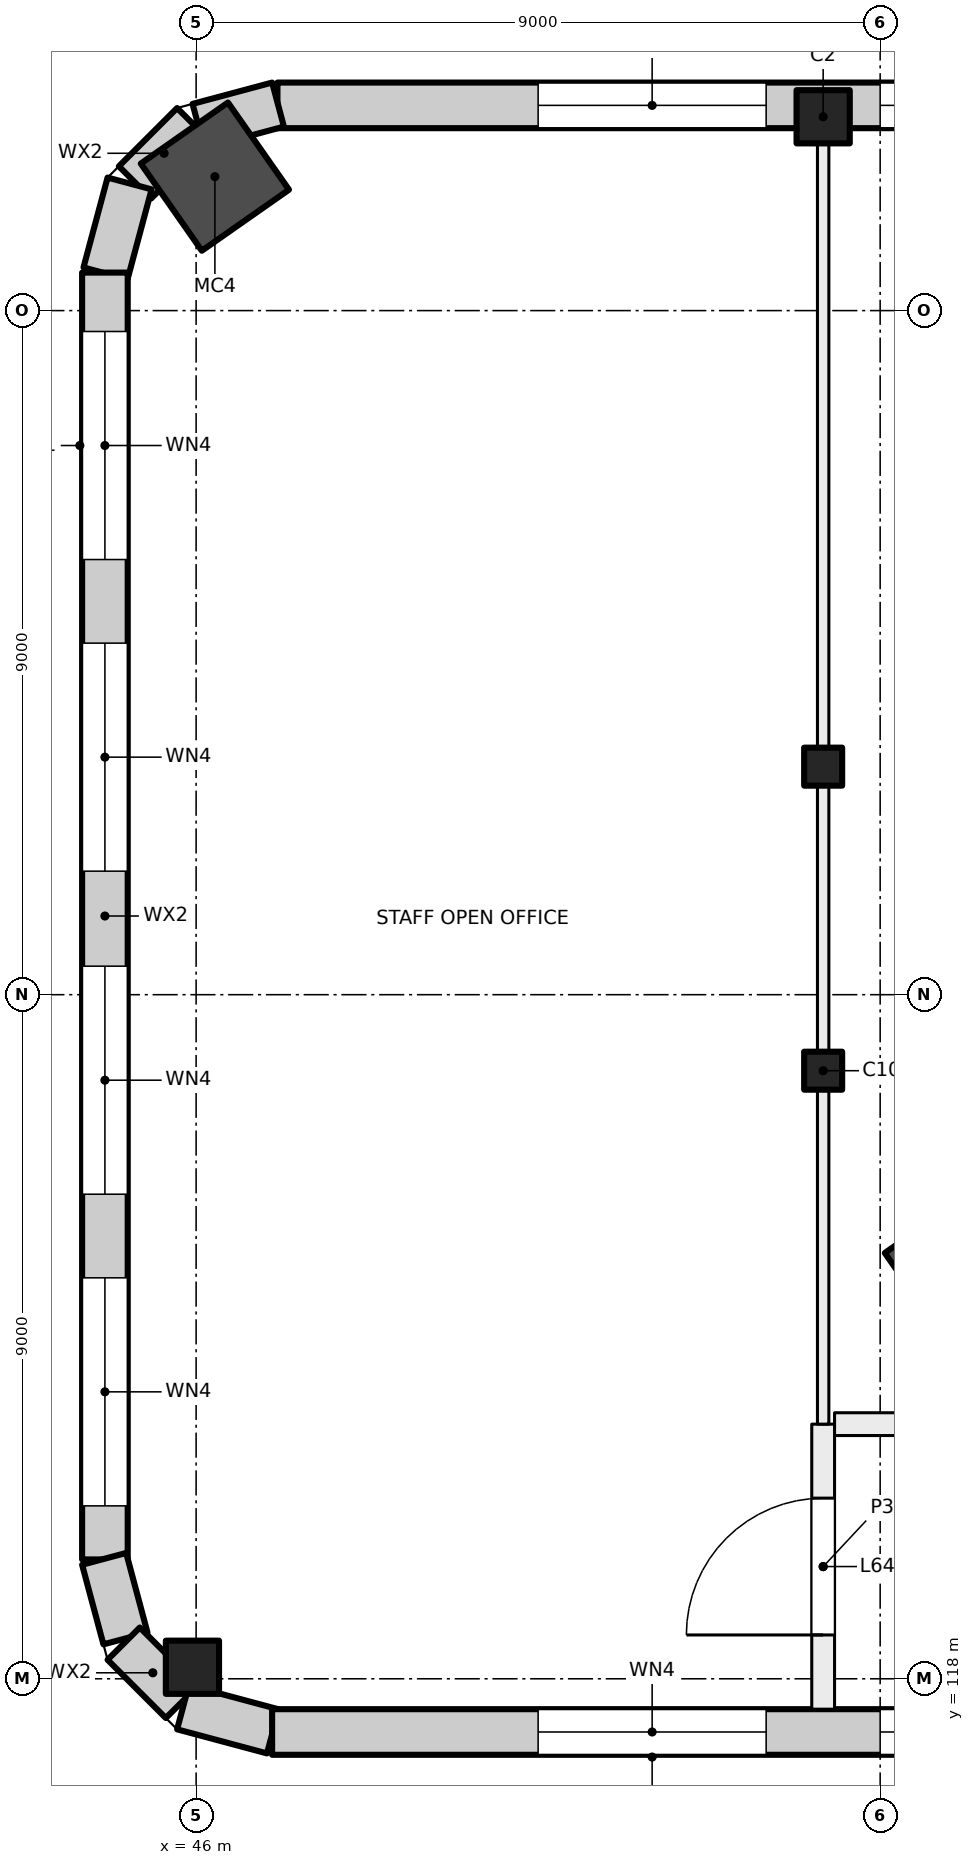
"""IFC4 building model, lengths in metres.
Left out: names, types, materials, properties, quantities, classifications, styles, units other than length and angle.
Written with IfcOpenShell. Run it as: python <this file> out.ifc"""

import sys

from ifc_helpers import new_model, si_unit, direction, frame, frame_2d, origin, origin_2d, place, context, subcontext, project, spatial, rectangle, hollow_rectangle, extrude, element, fill, save


model = new_model("IFC4")
c1 = context("Model", 3, precision=1e-05, world=origin(), true_north=direction((0.0, 1.0)))
c2 = subcontext(c1, "Body", "Model", "MODEL_VIEW")
j1 = project(units=[si_unit("LENGTHUNIT", "METRE"), si_unit("PLANEANGLEUNIT", "RADIAN")], contexts=[c1])
p1 = place(None, origin())
s1 = spatial("IfcSite", under=j1, at=p1, CompositionType="ELEMENT")
p2 = place(p1, origin())
s2 = spatial("IfcBuilding", under=s1, at=p2, CompositionType="ELEMENT")
p3 = place(p2, frame((0.0, 0.0, 269.5)))
s3 = spatial("IfcBuildingStorey", under=s2, at=p3, CompositionType="ELEMENT", Elevation=269.5)
for number, where, z_axis, x_axis in (
    (1, (46.247, 137.762, 0.0), (0.0, 0.0, 1.0), (0.574, -0.819, 0.0)),
    (2, (56.036, 123.43, 0.0), (0.0, 0.0, 1.0), (0.574, -0.819, 0.0)),
):
    element("IfcColumn", number, at=place(p3, frame(where, z_axis=z_axis, x_axis=x_axis)), inside=s3, PredefinedType="COLUMN", context=c2, shape_type="SweptSolid", body=[
        extrude(hollow_rectangle(XDim=1.4, YDim=1.4, WallThickness=0.025, at=origin_2d()), origin(), (0.0, 0.0, 1.0), 4.0),
    ])
for number, where, z_axis, x_axis in (
    (3, (54.25, 130.0, 0.0), (0.0, 0.0, 1.0), (1.0, 0.0, 0.0)),
    (4, (54.25, 126.0, 0.0), (0.0, 0.0, 1.0), (1.0, 0.0, 0.0)),
):
    element("IfcColumn", number, at=place(p3, frame(where, z_axis=z_axis, x_axis=x_axis)), inside=s3, PredefinedType="COLUMN", context=c2, shape_type="SweptSolid", body=[
        extrude(rectangle(XDim=0.5, YDim=0.5, at=origin_2d()), origin(), (0.0, 0.0, 1.0), 4.0),
    ])
for number, where, z_axis, x_axis in (
    (5, (54.25, 138.55, 0.0), (0.0, 0.0, 1.0), (1.0, 0.0, 0.0)),
    (6, (45.952, 118.152, 0.0), (0.0, 0.0, 1.0), (1.0, 0.0, 0.0)),
):
    element("IfcColumn", number, at=place(p3, frame(where, z_axis=z_axis, x_axis=x_axis)), inside=s3, PredefinedType="COLUMN", context=c2, shape_type="SweptSolid", body=[
        extrude(rectangle(XDim=0.7, YDim=0.7, at=origin_2d()), origin(), (0.0, 0.0, 1.0), 4.0),
    ])
p4 = place(p3, frame((47.07, 138.7, 0.0), z_axis=(0.0, 0.0, 1.0), x_axis=(1.0, 0.0, 0.0)))
e7 = element("IfcWall", 7, at=p4, inside=s3, PredefinedType="SOLIDWALL", context=c2, shape_type="SweptSolid", body=[
    extrude(rectangle(XDim=43.91, YDim=0.6, at=frame_2d((21.955, 0.0))), origin(), (0.0, 0.0, 1.0), 3.625),
])
p5 = place(p4, frame((3.43, 0.0, 0.9)))
e8 = element("IfcOpeningElement", 8, at=p5, cuts=e7, PredefinedType="OPENING", context=c2, shape_type="SweptSolid", body=[
    extrude(rectangle(XDim=3.0, YDim=2.4, at=frame_2d((1.5, 1.2))), frame((0.0, 0.31, 0.0), z_axis=(0.0, -1.0, 0.0), x_axis=(1.0, 0.0, 0.0)), (0.0, 0.0, 1.0), 0.62),
])
p6 = place(p4, frame((7.93, 0.0, 0.9)))
e9 = element("IfcOpeningElement", 9, at=p6, cuts=e7, PredefinedType="OPENING", context=c2, shape_type="SweptSolid", body=[
    extrude(rectangle(XDim=3.0, YDim=2.4, at=frame_2d((1.5, 1.2))), frame((0.0, 0.31, 0.0), z_axis=(0.0, -1.0, 0.0), x_axis=(1.0, 0.0, 0.0)), (0.0, 0.0, 1.0), 0.62),
])
p7 = place(p4, frame((12.43, 0.0, 0.9)))
e10 = element("IfcOpeningElement", 10, at=p7, cuts=e7, PredefinedType="OPENING", context=c2, shape_type="SweptSolid", body=[
    extrude(rectangle(XDim=3.0, YDim=2.4, at=frame_2d((1.5, 1.2))), frame((0.0, 0.31, 0.0), z_axis=(0.0, -1.0, 0.0), x_axis=(1.0, 0.0, 0.0)), (0.0, 0.0, 1.0), 0.62),
])
p8 = place(p4, frame((16.93, 0.0, 0.9)))
e11 = element("IfcOpeningElement", 11, at=p8, cuts=e7, PredefinedType="OPENING", context=c2, shape_type="SweptSolid", body=[
    extrude(rectangle(XDim=3.0, YDim=2.4, at=frame_2d((1.5, 1.2))), frame((0.0, 0.31, 0.0), z_axis=(0.0, -1.0, 0.0), x_axis=(1.0, 0.0, 0.0)), (0.0, 0.0, 1.0), 0.62),
])
p9 = place(p4, frame((21.43, 0.0, 0.9)))
e12 = element("IfcOpeningElement", 12, at=p9, cuts=e7, PredefinedType="OPENING", context=c2, shape_type="SweptSolid", body=[
    extrude(rectangle(XDim=3.0, YDim=2.4, at=frame_2d((1.5, 1.2))), frame((0.0, 0.31, 0.0), z_axis=(0.0, -1.0, 0.0), x_axis=(1.0, 0.0, 0.0)), (0.0, 0.0, 1.0), 0.62),
])
p10 = place(p4, frame((25.93, 0.0, 0.9)))
e13 = element("IfcOpeningElement", 13, at=p10, cuts=e7, PredefinedType="OPENING", context=c2, shape_type="SweptSolid", body=[
    extrude(rectangle(XDim=3.0, YDim=2.4, at=frame_2d((1.5, 1.2))), frame((0.0, 0.31, 0.0), z_axis=(0.0, -1.0, 0.0), x_axis=(1.0, 0.0, 0.0)), (0.0, 0.0, 1.0), 0.62),
])
p11 = place(p4, frame((30.43, 0.0, 0.9)))
e14 = element("IfcOpeningElement", 14, at=p11, cuts=e7, PredefinedType="OPENING", context=c2, shape_type="SweptSolid", body=[
    extrude(rectangle(XDim=3.0, YDim=2.4, at=frame_2d((1.5, 1.2))), frame((0.0, 0.31, 0.0), z_axis=(0.0, -1.0, 0.0), x_axis=(1.0, 0.0, 0.0)), (0.0, 0.0, 1.0), 0.62),
])
p12 = place(p4, frame((34.93, 0.0, 0.9)))
e15 = element("IfcOpeningElement", 15, at=p12, cuts=e7, PredefinedType="OPENING", context=c2, shape_type="SweptSolid", body=[
    extrude(rectangle(XDim=3.0, YDim=2.4, at=frame_2d((1.5, 1.2))), frame((0.0, 0.31, 0.0), z_axis=(0.0, -1.0, 0.0), x_axis=(1.0, 0.0, 0.0)), (0.0, 0.0, 1.0), 0.62),
])
p13 = place(p4, frame((39.43, 0.0, 0.9)))
e16 = element("IfcOpeningElement", 16, at=p13, cuts=e7, PredefinedType="OPENING", context=c2, shape_type="SweptSolid", body=[
    extrude(rectangle(XDim=3.0, YDim=2.4, at=frame_2d((1.5, 1.2))), frame((0.0, 0.31, 0.0), z_axis=(0.0, -1.0, 0.0), x_axis=(1.0, 0.0, 0.0)), (0.0, 0.0, 1.0), 0.62),
])
p14 = place(p3, frame((46.031, 138.43, 0.0), z_axis=(0.0, 0.0, 1.0), x_axis=(0.965939004864, 0.25876985698, 0.0)))
e17 = element("IfcWall", 17, at=p14, inside=s3, PredefinedType="SOLIDWALL", context=c2, shape_type="SweptSolid", body=[
    extrude(rectangle(XDim=1.084, YDim=0.6, at=frame_2d((0.542, 0.0))), origin(), (0.0, 0.0, 1.0), 3.625),
])
p15 = place(p3, frame((45.196, 137.686, 0.0), z_axis=(0.0, 0.0, 1.0), x_axis=(0.707106781187, 0.707106781187, 0.0)))
e18 = element("IfcWall", 18, at=p15, inside=s3, PredefinedType="SOLIDWALL", context=c2, shape_type="SweptSolid", body=[
    extrude(rectangle(XDim=1.084, YDim=0.6, at=frame_2d((0.542, 0.0))), origin(), (0.0, 0.0, 1.0), 3.625),
])
p16 = place(p3, frame((44.808, 136.49, 0.0), z_axis=(0.0, 0.0, 1.0), x_axis=(0.258878975098, 0.965909766102, 0.0)))
e19 = element("IfcWall", 19, at=p16, inside=s3, PredefinedType="SOLIDWALL", context=c2, shape_type="SweptSolid", body=[
    extrude(rectangle(XDim=1.224, YDim=0.6, at=frame_2d((0.612, 0.0))), origin(), (0.0, 0.0, 1.0), 3.625),
])
p17 = place(p3, frame((44.8, 119.57, 0.0), z_axis=(0.0, 0.0, 1.0), x_axis=(0.0, 1.0, 0.0)))
e20 = element("IfcWall", 20, at=p17, inside=s3, PredefinedType="SOLIDWALL", context=c2, shape_type="SweptSolid", body=[
    extrude(rectangle(XDim=16.93, YDim=0.6, at=frame_2d((8.465, 0.0))), origin(), (0.0, 0.0, 1.0), 3.625),
])
p18 = place(p17, frame((0.705, 0.0, 0.9)))
e21 = element("IfcOpeningElement", 21, at=p18, cuts=e20, PredefinedType="OPENING", context=c2, shape_type="SweptSolid", body=[
    extrude(rectangle(XDim=3.0, YDim=2.4, at=frame_2d((1.5, 1.2))), frame((0.0, 0.31, 0.0), z_axis=(0.0, -1.0, 0.0), x_axis=(1.0, 0.0, 0.0)), (0.0, 0.0, 1.0), 0.62),
])
p19 = place(p17, frame((4.805, 0.0, 0.9)))
e22 = element("IfcOpeningElement", 22, at=p19, cuts=e20, PredefinedType="OPENING", context=c2, shape_type="SweptSolid", body=[
    extrude(rectangle(XDim=3.0, YDim=2.4, at=frame_2d((1.5, 1.2))), frame((0.0, 0.31, 0.0), z_axis=(0.0, -1.0, 0.0), x_axis=(1.0, 0.0, 0.0)), (0.0, 0.0, 1.0), 0.62),
])
p20 = place(p17, frame((9.055, 0.0, 0.9)))
e23 = element("IfcOpeningElement", 23, at=p20, cuts=e20, PredefinedType="OPENING", context=c2, shape_type="SweptSolid", body=[
    extrude(rectangle(XDim=3.0, YDim=2.4, at=frame_2d((1.5, 1.2))), frame((0.0, 0.31, 0.0), z_axis=(0.0, -1.0, 0.0), x_axis=(1.0, 0.0, 0.0)), (0.0, 0.0, 1.0), 0.62),
])
p21 = place(p17, frame((13.155, 0.0, 0.9)))
e24 = element("IfcOpeningElement", 24, at=p21, cuts=e20, PredefinedType="OPENING", context=c2, shape_type="SweptSolid", body=[
    extrude(rectangle(XDim=3.0, YDim=2.4, at=frame_2d((1.5, 1.2))), frame((0.0, 0.31, 0.0), z_axis=(0.0, -1.0, 0.0), x_axis=(1.0, 0.0, 0.0)), (0.0, 0.0, 1.0), 0.62),
])
p22 = place(p3, frame((45.07, 118.531, 0.0), z_axis=(0.0, 0.0, 1.0), x_axis=(-0.25876985698, 0.965939004864, 0.0)))
e25 = element("IfcWall", 25, at=p22, inside=s3, PredefinedType="SOLIDWALL", context=c2, shape_type="SweptSolid", body=[
    extrude(rectangle(XDim=1.084, YDim=0.6, at=frame_2d((0.542, 0.0))), origin(), (0.0, 0.0, 1.0), 3.625),
])
p23 = place(p3, frame((45.814, 117.696, 0.0), z_axis=(0.0, 0.0, 1.0), x_axis=(-0.707106781187, 0.707106781187, 0.0)))
e26 = element("IfcWall", 26, at=p23, inside=s3, PredefinedType="SOLIDWALL", context=c2, shape_type="SweptSolid", body=[
    extrude(rectangle(XDim=1.084, YDim=0.6, at=frame_2d((0.542, 0.0))), origin(), (0.0, 0.0, 1.0), 3.625),
])
p24 = place(p3, frame((47.01, 117.308, 0.0), z_axis=(0.0, 0.0, 1.0), x_axis=(-0.965909766102, 0.258878975098, 0.0)))
e27 = element("IfcWall", 27, at=p24, inside=s3, PredefinedType="SOLIDWALL", context=c2, shape_type="SweptSolid", body=[
    extrude(rectangle(XDim=1.224, YDim=0.6, at=frame_2d((0.612, 0.0))), origin(), (0.0, 0.0, 1.0), 3.625),
])
p25 = place(p3, frame((90.98, 117.3, 0.0), z_axis=(0.0, 0.0, 1.0), x_axis=(-1.0, 0.0, 0.0)))
e28 = element("IfcWall", 28, at=p25, inside=s3, PredefinedType="SOLIDWALL", context=c2, shape_type="SweptSolid", body=[
    extrude(rectangle(XDim=43.98, YDim=0.6, at=frame_2d((21.99, 0.0))), origin(), (0.0, 0.0, 1.0), 3.625),
])
p26 = place(p25, frame((1.48, 0.0, 0.9)))
e29 = element("IfcOpeningElement", 29, at=p26, cuts=e28, PredefinedType="OPENING", context=c2, shape_type="SweptSolid", body=[
    extrude(rectangle(XDim=3.0, YDim=2.4, at=frame_2d((1.5, 1.2))), frame((0.0, 0.31, 0.0), z_axis=(0.0, -1.0, 0.0), x_axis=(1.0, 0.0, 0.0)), (0.0, 0.0, 1.0), 0.62),
])
p27 = place(p25, frame((5.98, 0.0, 0.9)))
e30 = element("IfcOpeningElement", 30, at=p27, cuts=e28, PredefinedType="OPENING", context=c2, shape_type="SweptSolid", body=[
    extrude(rectangle(XDim=3.0, YDim=2.4, at=frame_2d((1.5, 1.2))), frame((0.0, 0.31, 0.0), z_axis=(0.0, -1.0, 0.0), x_axis=(1.0, 0.0, 0.0)), (0.0, 0.0, 1.0), 0.62),
])
p28 = place(p25, frame((10.48, 0.0, 0.9)))
e31 = element("IfcOpeningElement", 31, at=p28, cuts=e28, PredefinedType="OPENING", context=c2, shape_type="SweptSolid", body=[
    extrude(rectangle(XDim=3.0, YDim=2.4, at=frame_2d((1.5, 1.2))), frame((0.0, 0.31, 0.0), z_axis=(0.0, -1.0, 0.0), x_axis=(1.0, 0.0, 0.0)), (0.0, 0.0, 1.0), 0.62),
])
p29 = place(p25, frame((14.98, 0.0, 0.9)))
e32 = element("IfcOpeningElement", 32, at=p29, cuts=e28, PredefinedType="OPENING", context=c2, shape_type="SweptSolid", body=[
    extrude(rectangle(XDim=3.0, YDim=2.4, at=frame_2d((1.5, 1.2))), frame((0.0, 0.31, 0.0), z_axis=(0.0, -1.0, 0.0), x_axis=(1.0, 0.0, 0.0)), (0.0, 0.0, 1.0), 0.62),
])
p30 = place(p25, frame((19.48, 0.0, 0.9)))
e33 = element("IfcOpeningElement", 33, at=p30, cuts=e28, PredefinedType="OPENING", context=c2, shape_type="SweptSolid", body=[
    extrude(rectangle(XDim=3.0, YDim=2.4, at=frame_2d((1.5, 1.2))), frame((0.0, 0.31, 0.0), z_axis=(0.0, -1.0, 0.0), x_axis=(1.0, 0.0, 0.0)), (0.0, 0.0, 1.0), 0.62),
])
p31 = place(p25, frame((23.98, 0.0, 0.9)))
e34 = element("IfcOpeningElement", 34, at=p31, cuts=e28, PredefinedType="OPENING", context=c2, shape_type="SweptSolid", body=[
    extrude(rectangle(XDim=3.0, YDim=2.4, at=frame_2d((1.5, 1.2))), frame((0.0, 0.31, 0.0), z_axis=(0.0, -1.0, 0.0), x_axis=(1.0, 0.0, 0.0)), (0.0, 0.0, 1.0), 0.62),
])
p32 = place(p25, frame((28.48, 0.0, 0.9)))
e35 = element("IfcOpeningElement", 35, at=p32, cuts=e28, PredefinedType="OPENING", context=c2, shape_type="SweptSolid", body=[
    extrude(rectangle(XDim=3.0, YDim=2.4, at=frame_2d((1.5, 1.2))), frame((0.0, 0.31, 0.0), z_axis=(0.0, -1.0, 0.0), x_axis=(1.0, 0.0, 0.0)), (0.0, 0.0, 1.0), 0.62),
])
p33 = place(p25, frame((32.98, 0.0, 0.9)))
e36 = element("IfcOpeningElement", 36, at=p33, cuts=e28, PredefinedType="OPENING", context=c2, shape_type="SweptSolid", body=[
    extrude(rectangle(XDim=3.0, YDim=2.4, at=frame_2d((1.5, 1.2))), frame((0.0, 0.31, 0.0), z_axis=(0.0, -1.0, 0.0), x_axis=(1.0, 0.0, 0.0)), (0.0, 0.0, 1.0), 0.62),
])
p34 = place(p25, frame((37.48, 0.0, 0.9)))
e37 = element("IfcOpeningElement", 37, at=p34, cuts=e28, PredefinedType="OPENING", context=c2, shape_type="SweptSolid", body=[
    extrude(rectangle(XDim=3.0, YDim=2.4, at=frame_2d((1.5, 1.2))), frame((0.0, 0.31, 0.0), z_axis=(0.0, -1.0, 0.0), x_axis=(1.0, 0.0, 0.0)), (0.0, 0.0, 1.0), 0.62),
])
p35 = place(p3, frame((54.25, 117.6, 0.0), z_axis=(0.0, 0.0, 1.0), x_axis=(0.0, 1.0, 0.0)))
e38 = element("IfcWall", 38, at=p35, inside=s3, PredefinedType="PARTITIONING", context=c2, shape_type="SweptSolid", body=[
    extrude(rectangle(XDim=3.75, YDim=0.3, at=frame_2d((1.875, 0.0))), origin(), (0.0, 0.0, 1.0), 3.625),
])
p36 = place(p35, frame((0.977, 0.0, 0.0)))
e39 = element("IfcOpeningElement", 39, at=p36, cuts=e38, PredefinedType="OPENING", context=c2, shape_type="SweptSolid", body=[
    extrude(rectangle(XDim=1.8, YDim=2.1, at=frame_2d((0.9, 1.05))), frame((0.0, 0.16, 0.0), z_axis=(0.0, -1.0, 0.0), x_axis=(1.0, 0.0, 0.0)), (0.0, 0.0, 1.0), 0.32),
])
p37 = place(p3, frame((54.4, 121.35, 0.0), z_axis=(0.0, 0.0, 1.0), x_axis=(1.0, 0.0, 0.0)))
e40 = element("IfcWall", 40, at=p37, inside=s3, PredefinedType="PARTITIONING", context=c2, shape_type="SweptSolid", body=[
    extrude(rectangle(XDim=31.425, YDim=0.3, at=frame_2d((15.712, 0.0))), origin(), (0.0, 0.0, 1.0), 3.625),
])
p38 = place(p37, frame((18.95, 0.0, 0.0)))
e41 = element("IfcOpeningElement", 41, at=p38, cuts=e40, PredefinedType="OPENING", context=c2, shape_type="SweptSolid", body=[
    extrude(rectangle(XDim=0.8, YDim=2.1, at=frame_2d((0.4, 1.05))), frame((0.0, 0.16, 0.0), z_axis=(0.0, -1.0, 0.0), x_axis=(1.0, 0.0, 0.0)), (0.0, 0.0, 1.0), 0.32),
])
p39 = place(p37, frame((25.2, 0.0, 0.0)))
e42 = element("IfcOpeningElement", 42, at=p39, cuts=e40, PredefinedType="OPENING", context=c2, shape_type="SweptSolid", body=[
    extrude(rectangle(XDim=1.8, YDim=2.1, at=frame_2d((0.9, 1.05))), frame((0.0, 0.16, 0.0), z_axis=(0.0, -1.0, 0.0), x_axis=(1.0, 0.0, 0.0)), (0.0, 0.0, 1.0), 0.32),
])
p40 = place(p37, frame((12.85, 0.0, 0.0)))
e43 = element("IfcOpeningElement", 43, at=p40, cuts=e40, PredefinedType="OPENING", context=c2, shape_type="SweptSolid", body=[
    extrude(rectangle(XDim=1.0, YDim=2.1, at=frame_2d((0.5, 1.05))), frame((0.0, 0.16, 0.0), z_axis=(0.0, -1.0, 0.0), x_axis=(1.0, 0.0, 0.0)), (0.0, 0.0, 1.0), 0.32),
])
p41 = place(p37, frame((3.515, 0.0, 0.0)))
e44 = element("IfcOpeningElement", 44, at=p41, cuts=e40, PredefinedType="OPENING", context=c2, shape_type="SweptSolid", body=[
    extrude(rectangle(XDim=1.8, YDim=2.1, at=frame_2d((0.9, 1.05))), frame((0.0, 0.16, 0.0), z_axis=(0.0, -1.0, 0.0), x_axis=(1.0, 0.0, 0.0)), (0.0, 0.0, 1.0), 0.32),
])
p42 = place(p3, frame((54.25, 138.4, 0.0), z_axis=(0.0, 0.0, 1.0), x_axis=(0.0, -1.0, 0.0)))
e45 = element("IfcWall", 45, at=p42, inside=s3, PredefinedType="PARTITIONING", context=c2, shape_type="SweptSolid", body=[
    extrude(rectangle(XDim=17.05, YDim=0.15, at=frame_2d((8.525, 0.0))), origin(), (0.0, 0.0, 1.0), 3.625),
])
p43 = place(p5, origin())
e46 = element("IfcWindow", 46, at=p43, inside=s3, PartitioningType="SINGLE_PANEL", PredefinedType="WINDOW", context=c2, shape_type="SweptSolid", body=[
    extrude(rectangle(XDim=3.0, YDim=2.4, at=frame_2d((1.5, 1.2))), frame((0.0, 0.03, 0.0), z_axis=(0.0, -1.0, 0.0), x_axis=(1.0, 0.0, 0.0)), (0.0, 0.0, 1.0), 0.06),
])
fill(e8, e46)
p44 = place(p6, origin())
e47 = element("IfcWindow", 47, at=p44, inside=s3, PartitioningType="SINGLE_PANEL", PredefinedType="WINDOW", context=c2, shape_type="SweptSolid", body=[
    extrude(rectangle(XDim=3.0, YDim=2.4, at=frame_2d((1.5, 1.2))), frame((0.0, 0.03, 0.0), z_axis=(0.0, -1.0, 0.0), x_axis=(1.0, 0.0, 0.0)), (0.0, 0.0, 1.0), 0.06),
])
fill(e9, e47)
p45 = place(p18, origin())
e48 = element("IfcWindow", 48, at=p45, inside=s3, PartitioningType="SINGLE_PANEL", PredefinedType="WINDOW", context=c2, shape_type="SweptSolid", body=[
    extrude(rectangle(XDim=3.0, YDim=2.4, at=frame_2d((1.5, 1.2))), frame((0.0, 0.03, 0.0), z_axis=(0.0, -1.0, 0.0), x_axis=(1.0, 0.0, 0.0)), (0.0, 0.0, 1.0), 0.06),
])
fill(e21, e48)
p46 = place(p19, origin())
e49 = element("IfcWindow", 49, at=p46, inside=s3, PartitioningType="SINGLE_PANEL", PredefinedType="WINDOW", context=c2, shape_type="SweptSolid", body=[
    extrude(rectangle(XDim=3.0, YDim=2.4, at=frame_2d((1.5, 1.2))), frame((0.0, 0.03, 0.0), z_axis=(0.0, -1.0, 0.0), x_axis=(1.0, 0.0, 0.0)), (0.0, 0.0, 1.0), 0.06),
])
fill(e22, e49)
p47 = place(p20, origin())
e50 = element("IfcWindow", 50, at=p47, inside=s3, PartitioningType="SINGLE_PANEL", PredefinedType="WINDOW", context=c2, shape_type="SweptSolid", body=[
    extrude(rectangle(XDim=3.0, YDim=2.4, at=frame_2d((1.5, 1.2))), frame((0.0, 0.03, 0.0), z_axis=(0.0, -1.0, 0.0), x_axis=(1.0, 0.0, 0.0)), (0.0, 0.0, 1.0), 0.06),
])
fill(e23, e50)
p48 = place(p21, origin())
e51 = element("IfcWindow", 51, at=p48, inside=s3, PartitioningType="SINGLE_PANEL", PredefinedType="WINDOW", context=c2, shape_type="SweptSolid", body=[
    extrude(rectangle(XDim=3.0, YDim=2.4, at=frame_2d((1.5, 1.2))), frame((0.0, 0.03, 0.0), z_axis=(0.0, -1.0, 0.0), x_axis=(1.0, 0.0, 0.0)), (0.0, 0.0, 1.0), 0.06),
])
fill(e24, e51)
p49 = place(p33, origin())
e52 = element("IfcWindow", 52, at=p49, inside=s3, PartitioningType="SINGLE_PANEL", PredefinedType="WINDOW", context=c2, shape_type="SweptSolid", body=[
    extrude(rectangle(XDim=3.0, YDim=2.4, at=frame_2d((1.5, 1.2))), frame((0.0, 0.03, 0.0), z_axis=(0.0, -1.0, 0.0), x_axis=(1.0, 0.0, 0.0)), (0.0, 0.0, 1.0), 0.06),
])
fill(e36, e52)
p50 = place(p34, origin())
e53 = element("IfcWindow", 53, at=p50, inside=s3, PartitioningType="SINGLE_PANEL", PredefinedType="WINDOW", context=c2, shape_type="SweptSolid", body=[
    extrude(rectangle(XDim=3.0, YDim=2.4, at=frame_2d((1.5, 1.2))), frame((0.0, 0.03, 0.0), z_axis=(0.0, -1.0, 0.0), x_axis=(1.0, 0.0, 0.0)), (0.0, 0.0, 1.0), 0.06),
])
fill(e37, e53)
p51 = place(p36, origin())
e54 = element("IfcDoor", 54, at=p51, inside=s3, OperationType="DOUBLE_DOOR_SINGLE_SWING", PredefinedType="DOOR", context=c2, shape_type="SweptSolid", body=[
    extrude(rectangle(XDim=1.8, YDim=2.1, at=frame_2d((0.9, 1.05))), frame((0.0, 0.025, 0.0), z_axis=(0.0, -1.0, 0.0), x_axis=(1.0, 0.0, 0.0)), (0.0, 0.0, 1.0), 0.05),
])
fill(e39, e54)
save(model, sys.argv[1])
